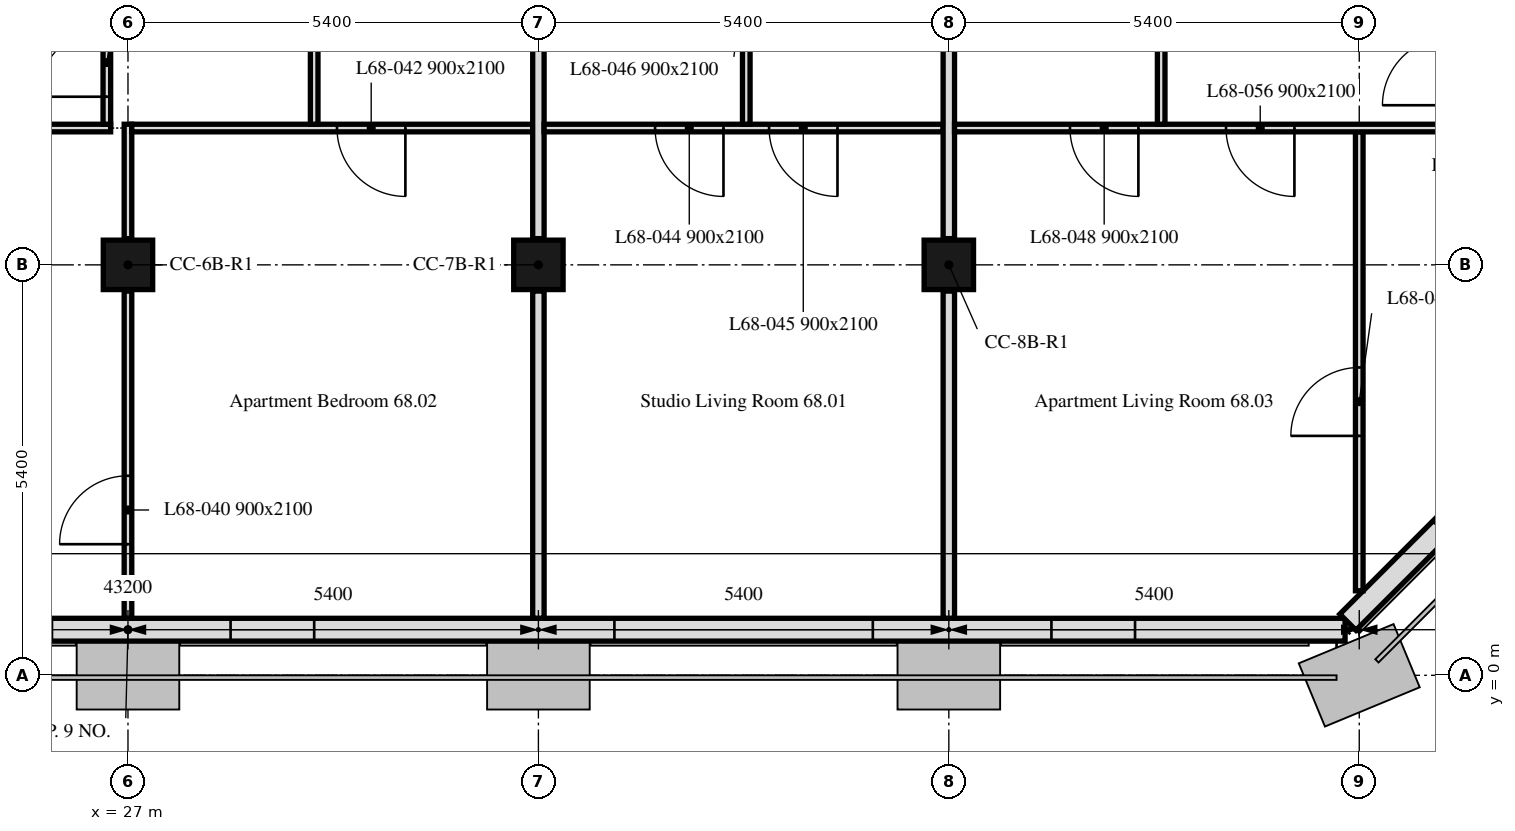
"""IFC4 building model, lengths in metres.
Left out: names, types, materials, properties, quantities, classifications, styles, units other than length and angle.
Written with IfcOpenShell. Run it as: python <this file> out.ifc"""

import sys

from ifc_helpers import new_model, si_unit, direction, frame, frame_2d, origin, origin_2d, place, context, subcontext, project, spatial, rectangle, extrude, element, fill, save


model = new_model("IFC4")
c1 = context("Model", 3, precision=1e-05, world=origin(), true_north=direction((0.0, 1.0)))
c2 = subcontext(c1, "Body", "Model", "MODEL_VIEW")
j1 = project(units=[si_unit("LENGTHUNIT", "METRE"), si_unit("PLANEANGLEUNIT", "RADIAN")], contexts=[c1])
p1 = place(None, origin())
s1 = spatial("IfcSite", under=j1, at=p1, CompositionType="ELEMENT")
p2 = place(p1, origin())
s2 = spatial("IfcBuilding", under=s1, at=p2, CompositionType="ELEMENT")
p3 = place(p2, frame((0.0, 0.0, 278.5)))
s3 = spatial("IfcBuildingStorey", under=s2, at=p3, CompositionType="ELEMENT", Elevation=278.5)
for number, where, z_axis, x_axis in (
    (1, (27.0, 5.4, 0.0), (0.0, 0.0, 1.0), (1.0, 0.0, 0.0)),
    (2, (32.4, 5.4, 0.0), (0.0, 0.0, 1.0), (1.0, 0.0, 0.0)),
    (3, (37.8, 5.4, 0.0), (0.0, 0.0, 1.0), (1.0, 0.0, 0.0)),
):
    element("IfcColumn", number, at=place(p3, frame(where, z_axis=z_axis, x_axis=x_axis)), inside=s3, PredefinedType="COLUMN", context=c2, shape_type="SweptSolid", body=[
        extrude(rectangle(XDim=0.65, YDim=0.65, at=origin_2d()), origin(), (0.0, 0.0, 1.0), 3.0),
    ])
p4 = place(p3, frame((10.986, 0.6, 0.0), z_axis=(0.0, 0.0, 1.0), x_axis=(1.0, 0.0, 0.0)))
e4 = element("IfcWall", 4, at=p4, inside=s3, PredefinedType="SOLIDWALL", context=c2, shape_type="SweptSolid", body=[
    extrude(rectangle(XDim=32.027, YDim=0.3, at=frame_2d((16.014, 0.0))), origin(), (0.0, 0.0, 1.0), 3.0),
])
p5 = place(p4, frame((0.814, 0.0, 0.9)))
e5 = element("IfcOpeningElement", 5, at=p5, cuts=e4, PredefinedType="OPENING", context=c2, shape_type="SweptSolid", body=[
    extrude(rectangle(XDim=3.4, YDim=1.7, at=frame_2d((1.7, 0.85))), frame((0.0, 0.16, 0.0), z_axis=(0.0, -1.0, 0.0), x_axis=(1.0, 0.0, 0.0)), (0.0, 0.0, 1.0), 0.32),
])
p6 = place(p4, frame((6.564, 0.0, 0.9)))
e6 = element("IfcOpeningElement", 6, at=p6, cuts=e4, PredefinedType="OPENING", context=c2, shape_type="SweptSolid", body=[
    extrude(rectangle(XDim=1.1, YDim=1.7, at=frame_2d((0.55, 0.85))), frame((0.0, 0.16, 0.0), z_axis=(0.0, -1.0, 0.0), x_axis=(1.0, 0.0, 0.0)), (0.0, 0.0, 1.0), 0.32),
])
p7 = place(p4, frame((11.614, 0.0, 0.9)))
e7 = element("IfcOpeningElement", 7, at=p7, cuts=e4, PredefinedType="OPENING", context=c2, shape_type="SweptSolid", body=[
    extrude(rectangle(XDim=3.4, YDim=1.7, at=frame_2d((1.7, 0.85))), frame((0.0, 0.16, 0.0), z_axis=(0.0, -1.0, 0.0), x_axis=(1.0, 0.0, 0.0)), (0.0, 0.0, 1.0), 0.32),
])
p8 = place(p4, frame((17.364, 0.0, 0.9)))
e8 = element("IfcOpeningElement", 8, at=p8, cuts=e4, PredefinedType="OPENING", context=c2, shape_type="SweptSolid", body=[
    extrude(rectangle(XDim=1.1, YDim=1.7, at=frame_2d((0.55, 0.85))), frame((0.0, 0.16, 0.0), z_axis=(0.0, -1.0, 0.0), x_axis=(1.0, 0.0, 0.0)), (0.0, 0.0, 1.0), 0.32),
])
p9 = place(p4, frame((22.414, 0.0, 0.9)))
e9 = element("IfcOpeningElement", 9, at=p9, cuts=e4, PredefinedType="OPENING", context=c2, shape_type="SweptSolid", body=[
    extrude(rectangle(XDim=3.4, YDim=1.7, at=frame_2d((1.7, 0.85))), frame((0.0, 0.16, 0.0), z_axis=(0.0, -1.0, 0.0), x_axis=(1.0, 0.0, 0.0)), (0.0, 0.0, 1.0), 0.32),
])
p10 = place(p4, frame((28.164, 0.0, 0.9)))
e10 = element("IfcOpeningElement", 10, at=p10, cuts=e4, PredefinedType="OPENING", context=c2, shape_type="SweptSolid", body=[
    extrude(rectangle(XDim=1.1, YDim=1.7, at=frame_2d((0.55, 0.85))), frame((0.0, 0.16, 0.0), z_axis=(0.0, -1.0, 0.0), x_axis=(1.0, 0.0, 0.0)), (0.0, 0.0, 1.0), 0.32),
])
p11 = place(p3, frame((43.051, 0.699, 0.0), z_axis=(0.0, 0.0, 1.0), x_axis=(0.707106781187, 0.707106781187, 0.0)))
e11 = element("IfcWall", 11, at=p11, inside=s3, PredefinedType="SOLIDWALL", context=c2, shape_type="SweptSolid", body=[
    extrude(rectangle(XDim=6.86, YDim=0.3, at=frame_2d((3.43, 0.0))), origin(), (0.0, 0.0, 1.0), 3.0),
])
p12 = place(p11, frame((1.73, 0.0, 0.9)))
e12 = element("IfcOpeningElement", 12, at=p12, cuts=e11, PredefinedType="OPENING", context=c2, shape_type="SweptSolid", body=[
    extrude(rectangle(XDim=3.4, YDim=1.7, at=frame_2d((1.7, 0.85))), frame((0.0, 0.16, 0.0), z_axis=(0.0, -1.0, 0.0), x_axis=(1.0, 0.0, 0.0)), (0.0, 0.0, 1.0), 0.32),
])
p13 = place(p3, frame((27.0, 0.751, 0.0), z_axis=(0.0, 0.0, 1.0), x_axis=(0.0, 1.0, 0.0)))
e13 = element("IfcWall", 13, at=p13, inside=s3, PredefinedType="PARTITIONING", context=c2, shape_type="SweptSolid", body=[
    extrude(rectangle(XDim=4.304, YDim=0.1, at=frame_2d((2.152, 0.0))), origin(), (0.0, 0.0, 1.0), 2.4),
])
p14 = place(p13, frame((0.974, 0.0, 0.0)))
e14 = element("IfcOpeningElement", 14, at=p14, cuts=e13, PredefinedType="OPENING", context=c2, shape_type="SweptSolid", body=[
    extrude(rectangle(XDim=0.9, YDim=2.1, at=frame_2d((0.45, 1.05))), frame((0.0, 0.05, 0.0), z_axis=(0.0, -1.0, 0.0), x_axis=(1.0, 0.0, 0.0)), (0.0, 0.0, 1.0), 0.1),
])
p15 = place(p3, frame((27.0, 5.745, 0.0), z_axis=(0.0, 0.0, 1.0), x_axis=(0.0, 1.0, 0.0)))
e15 = element("IfcWall", 15, at=p15, inside=s3, PredefinedType="PARTITIONING", context=c2, shape_type="SweptSolid", body=[
    extrude(rectangle(XDim=1.505, YDim=0.1, at=frame_2d((0.752, 0.0))), origin(), (0.0, 0.0, 1.0), 2.4),
])
p16 = place(p3, frame((26.772, 7.2, 0.0), z_axis=(0.0, 0.0, 1.0), x_axis=(-1.0, 0.0, 0.0)))
e16 = element("IfcWall", 16, at=p16, inside=s3, PredefinedType="PARTITIONING", context=c2, shape_type="SweptSolid", body=[
    extrude(rectangle(XDim=5.097, YDim=0.1, at=frame_2d((2.548, 0.0))), origin(), (0.0, 0.0, 1.0), 3.0),
])
p17 = place(p16, frame((3.801, 0.0, 0.0)))
e17 = element("IfcOpeningElement", 17, at=p17, cuts=e16, PredefinedType="OPENING", context=c2, shape_type="SweptSolid", body=[
    extrude(rectangle(XDim=0.9, YDim=2.1, at=frame_2d((0.45, 1.05))), frame((0.0, 0.05, 0.0), z_axis=(0.0, -1.0, 0.0), x_axis=(1.0, 0.0, 0.0)), (0.0, 0.0, 1.0), 0.1),
])
p18 = place(p16, frame((1.732, 0.0, 0.0)))
e18 = element("IfcOpeningElement", 18, at=p18, cuts=e16, PredefinedType="OPENING", context=c2, shape_type="SweptSolid", body=[
    extrude(rectangle(XDim=0.9, YDim=2.1, at=frame_2d((0.45, 1.05))), frame((0.0, 0.05, 0.0), z_axis=(0.0, -1.0, 0.0), x_axis=(1.0, 0.0, 0.0)), (0.0, 0.0, 1.0), 0.1),
])
p19 = place(p3, frame((32.4, 0.751, 0.0), z_axis=(0.0, 0.0, 1.0), x_axis=(0.0, 1.0, 0.0)))
e19 = element("IfcWall", 19, at=p19, inside=s3, PredefinedType="PARTITIONING", context=c2, shape_type="SweptSolid", body=[
    extrude(rectangle(XDim=4.304, YDim=0.15, at=frame_2d((2.152, 0.0))), origin(), (0.0, 0.0, 1.0), 2.4),
])
p20 = place(p3, frame((32.325, 7.2, 0.0), z_axis=(0.0, 0.0, 1.0), x_axis=(-1.0, 0.0, 0.0)))
e20 = element("IfcWall", 20, at=p20, inside=s3, PredefinedType="PARTITIONING", context=c2, shape_type="SweptSolid", body=[
    extrude(rectangle(XDim=5.275, YDim=0.1, at=frame_2d((2.637, 0.0))), origin(), (0.0, 0.0, 1.0), 3.0),
])
p21 = place(p20, frame((1.675, 0.0, 0.0)))
e21 = element("IfcOpeningElement", 21, at=p21, cuts=e20, PredefinedType="OPENING", context=c2, shape_type="SweptSolid", body=[
    extrude(rectangle(XDim=0.9, YDim=2.1, at=frame_2d((0.45, 1.05))), frame((0.0, 0.05, 0.0), z_axis=(0.0, -1.0, 0.0), x_axis=(1.0, 0.0, 0.0)), (0.0, 0.0, 1.0), 0.1),
])
p22 = place(p3, frame((26.722, 7.25, 0.0), z_axis=(0.0, 0.0, 1.0), x_axis=(0.0, 1.0, 0.0)))
e22 = element("IfcWall", 22, at=p22, inside=s3, PredefinedType="PARTITIONING", context=c2, shape_type="SweptSolid", body=[
    extrude(rectangle(XDim=3.205, YDim=0.1, at=frame_2d((1.603, 0.0))), origin(), (0.0, 0.0, 1.0), 3.0),
])
p23 = place(p22, frame((0.362, 0.0, 0.0)))
e23 = element("IfcOpeningElement", 23, at=p23, cuts=e22, PredefinedType="OPENING", context=c2, shape_type="SweptSolid", body=[
    extrude(rectangle(XDim=0.9, YDim=2.1, at=frame_2d((0.45, 1.05))), frame((0.0, 0.05, 0.0), z_axis=(0.0, -1.0, 0.0), x_axis=(1.0, 0.0, 0.0)), (0.0, 0.0, 1.0), 0.1),
])
p24 = place(p3, frame((29.45, 7.25, 0.0), z_axis=(0.0, 0.0, 1.0), x_axis=(0.0, 1.0, 0.0)))
e24 = element("IfcWall", 24, at=p24, inside=s3, PredefinedType="PARTITIONING", context=c2, shape_type="SweptSolid", body=[
    extrude(rectangle(XDim=7.075, YDim=0.1, at=frame_2d((3.538, 0.0))), origin(), (0.0, 0.0, 1.0), 3.0),
])
p25 = place(p3, frame((32.4, 5.745, 0.0), z_axis=(0.0, 0.0, 1.0), x_axis=(0.0, 1.0, 0.0)))
e25 = element("IfcWall", 25, at=p25, inside=s3, PredefinedType="PARTITIONING", context=c2, shape_type="SweptSolid", body=[
    extrude(rectangle(XDim=4.71, YDim=0.15, at=frame_2d((2.355, 0.0))), origin(), (0.0, 0.0, 1.0), 2.4),
])
p26 = place(p3, frame((37.8, 0.751, 0.0), z_axis=(0.0, 0.0, 1.0), x_axis=(0.0, 1.0, 0.0)))
e26 = element("IfcWall", 26, at=p26, inside=s3, PredefinedType="PARTITIONING", context=c2, shape_type="SweptSolid", body=[
    extrude(rectangle(XDim=4.304, YDim=0.15, at=frame_2d((2.152, 0.0))), origin(), (0.0, 0.0, 1.0), 2.4),
])
p27 = place(p3, frame((37.725, 7.2, 0.0), z_axis=(0.0, 0.0, 1.0), x_axis=(-1.0, 0.0, 0.0)))
e27 = element("IfcWall", 27, at=p27, inside=s3, PredefinedType="PARTITIONING", context=c2, shape_type="SweptSolid", body=[
    extrude(rectangle(XDim=5.25, YDim=0.1, at=frame_2d((2.625, 0.0))), origin(), (0.0, 0.0, 1.0), 3.0),
])
p28 = place(p27, frame((2.89, 0.0, 0.0)))
e28 = element("IfcOpeningElement", 28, at=p28, cuts=e27, PredefinedType="OPENING", context=c2, shape_type="SweptSolid", body=[
    extrude(rectangle(XDim=0.9, YDim=2.1, at=frame_2d((0.45, 1.05))), frame((0.0, 0.05, 0.0), z_axis=(0.0, -1.0, 0.0), x_axis=(1.0, 0.0, 0.0)), (0.0, 0.0, 1.0), 0.1),
])
p29 = place(p27, frame((1.39, 0.0, 0.0)))
e29 = element("IfcOpeningElement", 29, at=p29, cuts=e27, PredefinedType="OPENING", context=c2, shape_type="SweptSolid", body=[
    extrude(rectangle(XDim=0.9, YDim=2.1, at=frame_2d((0.45, 1.05))), frame((0.0, 0.05, 0.0), z_axis=(0.0, -1.0, 0.0), x_axis=(1.0, 0.0, 0.0)), (0.0, 0.0, 1.0), 0.1),
])
p30 = place(p3, frame((35.135, 7.25, 0.0), z_axis=(0.0, 0.0, 1.0), x_axis=(0.0, 1.0, 0.0)))
e30 = element("IfcWall", 30, at=p30, inside=s3, PredefinedType="PARTITIONING", context=c2, shape_type="SweptSolid", body=[
    extrude(rectangle(XDim=7.075, YDim=0.1, at=frame_2d((3.538, 0.0))), origin(), (0.0, 0.0, 1.0), 2.4),
])
p31 = place(p30, frame((5.45, 0.0, 0.0)))
e31 = element("IfcOpeningElement", 31, at=p31, cuts=e30, PredefinedType="OPENING", context=c2, shape_type="SweptSolid", body=[
    extrude(rectangle(XDim=0.9, YDim=2.1, at=frame_2d((0.45, 1.05))), frame((0.0, 0.05, 0.0), z_axis=(0.0, -1.0, 0.0), x_axis=(1.0, 0.0, 0.0)), (0.0, 0.0, 1.0), 0.1),
])
p32 = place(p30, frame((1.6, 0.0, 0.0)))
e32 = element("IfcOpeningElement", 32, at=p32, cuts=e30, PredefinedType="OPENING", context=c2, shape_type="SweptSolid", body=[
    extrude(rectangle(XDim=0.9, YDim=2.1, at=frame_2d((0.45, 1.05))), frame((0.0, 0.05, 0.0), z_axis=(0.0, -1.0, 0.0), x_axis=(1.0, 0.0, 0.0)), (0.0, 0.0, 1.0), 0.1),
])
p33 = place(p3, frame((37.8, 5.745, 0.0), z_axis=(0.0, 0.0, 1.0), x_axis=(0.0, 1.0, 0.0)))
e33 = element("IfcWall", 33, at=p33, inside=s3, PredefinedType="PARTITIONING", context=c2, shape_type="SweptSolid", body=[
    extrude(rectangle(XDim=4.71, YDim=0.15, at=frame_2d((2.355, 0.0))), origin(), (0.0, 0.0, 1.0), 2.4),
])
p34 = place(p3, frame((43.2, 1.112, 0.0), z_axis=(0.0, 0.0, 1.0), x_axis=(0.0, 1.0, 0.0)))
e34 = element("IfcWall", 34, at=p34, inside=s3, PredefinedType="PARTITIONING", context=c2, shape_type="SweptSolid", body=[
    extrude(rectangle(XDim=6.038, YDim=0.1, at=frame_2d((3.019, 0.0))), origin(), (0.0, 0.0, 1.0), 3.0),
])
p35 = place(p34, frame((2.038, 0.0, 0.0)))
e35 = element("IfcOpeningElement", 35, at=p35, cuts=e34, PredefinedType="OPENING", context=c2, shape_type="SweptSolid", body=[
    extrude(rectangle(XDim=0.9, YDim=2.1, at=frame_2d((0.45, 1.05))), frame((0.0, 0.05, 0.0), z_axis=(0.0, -1.0, 0.0), x_axis=(1.0, 0.0, 0.0)), (0.0, 0.0, 1.0), 0.1),
])
p36 = place(p3, frame((47.849, 7.2, 0.0), z_axis=(0.0, 0.0, 1.0), x_axis=(-1.0, 0.0, 0.0)))
e36 = element("IfcWall", 36, at=p36, inside=s3, PredefinedType="PARTITIONING", context=c2, shape_type="SweptSolid", body=[
    extrude(rectangle(XDim=9.974, YDim=0.1, at=frame_2d((4.987, 0.0))), origin(), (0.0, 0.0, 1.0), 3.0),
])
p37 = place(p36, frame((7.555, 0.0, 0.0)))
e37 = element("IfcOpeningElement", 37, at=p37, cuts=e36, PredefinedType="OPENING", context=c2, shape_type="SweptSolid", body=[
    extrude(rectangle(XDim=0.9, YDim=2.1, at=frame_2d((0.45, 1.05))), frame((0.0, 0.05, 0.0), z_axis=(0.0, -1.0, 0.0), x_axis=(1.0, 0.0, 0.0)), (0.0, 0.0, 1.0), 0.1),
])
p38 = place(p36, frame((5.502, 0.0, 0.0)))
e38 = element("IfcOpeningElement", 38, at=p38, cuts=e36, PredefinedType="OPENING", context=c2, shape_type="SweptSolid", body=[
    extrude(rectangle(XDim=0.9, YDim=2.1, at=frame_2d((0.45, 1.05))), frame((0.0, 0.05, 0.0), z_axis=(0.0, -1.0, 0.0), x_axis=(1.0, 0.0, 0.0)), (0.0, 0.0, 1.0), 0.1),
])
p39 = place(p36, frame((0.25, 0.0, 0.0)))
e39 = element("IfcOpeningElement", 39, at=p39, cuts=e36, PredefinedType="OPENING", context=c2, shape_type="SweptSolid", body=[
    extrude(rectangle(XDim=0.8, YDim=2.1, at=frame_2d((0.4, 1.05))), frame((0.0, 0.05, 0.0), z_axis=(0.0, -1.0, 0.0), x_axis=(1.0, 0.0, 0.0)), (0.0, 0.0, 1.0), 0.1),
])
p40 = place(p3, frame((40.594, 7.25, 0.0), z_axis=(0.0, 0.0, 1.0), x_axis=(0.0, 1.0, 0.0)))
e40 = element("IfcWall", 40, at=p40, inside=s3, PredefinedType="PARTITIONING", context=c2, shape_type="SweptSolid", body=[
    extrude(rectangle(XDim=7.075, YDim=0.1, at=frame_2d((3.538, 0.0))), origin(), (0.0, 0.0, 1.0), 2.4),
])
p41 = place(p40, frame((5.2, 0.0, 0.0)))
e41 = element("IfcOpeningElement", 41, at=p41, cuts=e40, PredefinedType="OPENING", context=c2, shape_type="SweptSolid", body=[
    extrude(rectangle(XDim=0.9, YDim=2.1, at=frame_2d((0.45, 1.05))), frame((0.0, 0.05, 0.0), z_axis=(0.0, -1.0, 0.0), x_axis=(1.0, 0.0, 0.0)), (0.0, 0.0, 1.0), 0.1),
])
p42 = place(p40, frame((1.6, 0.0, 0.0)))
e42 = element("IfcOpeningElement", 42, at=p42, cuts=e40, PredefinedType="OPENING", context=c2, shape_type="SweptSolid", body=[
    extrude(rectangle(XDim=0.9, YDim=2.1, at=frame_2d((0.45, 1.05))), frame((0.0, 0.05, 0.0), z_axis=(0.0, -1.0, 0.0), x_axis=(1.0, 0.0, 0.0)), (0.0, 0.0, 1.0), 0.1),
])
p43 = place(p8, origin())
e43 = element("IfcWindow", 43, at=p43, inside=s3, PartitioningType="SINGLE_PANEL", PredefinedType="WINDOW", context=c2, shape_type="SweptSolid", body=[
    extrude(rectangle(XDim=1.1, YDim=1.7, at=frame_2d((0.55, 0.85))), frame((0.0, 0.03, 0.0), z_axis=(0.0, -1.0, 0.0), x_axis=(1.0, 0.0, 0.0)), (0.0, 0.0, 1.0), 0.06),
])
fill(e8, e43)
p44 = place(p9, origin())
e44 = element("IfcWindow", 44, at=p44, inside=s3, PartitioningType="SINGLE_PANEL", PredefinedType="WINDOW", context=c2, shape_type="SweptSolid", body=[
    extrude(rectangle(XDim=3.4, YDim=1.7, at=frame_2d((1.7, 0.85))), frame((0.0, 0.03, 0.0), z_axis=(0.0, -1.0, 0.0), x_axis=(1.0, 0.0, 0.0)), (0.0, 0.0, 1.0), 0.06),
])
fill(e9, e44)
p45 = place(p10, origin())
e45 = element("IfcWindow", 45, at=p45, inside=s3, PartitioningType="SINGLE_PANEL", PredefinedType="WINDOW", context=c2, shape_type="SweptSolid", body=[
    extrude(rectangle(XDim=1.1, YDim=1.7, at=frame_2d((0.55, 0.85))), frame((0.0, 0.03, 0.0), z_axis=(0.0, -1.0, 0.0), x_axis=(1.0, 0.0, 0.0)), (0.0, 0.0, 1.0), 0.06),
])
fill(e10, e45)
p46 = place(p23, origin())
e46 = element("IfcDoor", 46, at=p46, inside=s3, OperationType="SINGLE_SWING_RIGHT", PredefinedType="DOOR", context=c2, shape_type="SweptSolid", body=[
    extrude(rectangle(XDim=0.9, YDim=2.1, at=frame_2d((0.45, 1.05))), frame((0.0, 0.025, 0.0), z_axis=(0.0, -1.0, 0.0), x_axis=(1.0, 0.0, 0.0)), (0.0, 0.0, 1.0), 0.05),
])
fill(e23, e46)
p47 = place(p14, origin())
e47 = element("IfcDoor", 47, at=p47, inside=s3, OperationType="SINGLE_SWING_RIGHT", PredefinedType="DOOR", context=c2, shape_type="SweptSolid", body=[
    extrude(rectangle(XDim=0.9, YDim=2.1, at=frame_2d((0.45, 1.05))), frame((0.0, 0.025, 0.0), z_axis=(0.0, -1.0, 0.0), x_axis=(1.0, 0.0, 0.0)), (0.0, 0.0, 1.0), 0.05),
])
fill(e14, e47)
p48 = place(p21, origin())
e48 = element("IfcDoor", 48, at=p48, inside=s3, OperationType="SINGLE_SWING_LEFT", PredefinedType="DOOR", context=c2, shape_type="SweptSolid", body=[
    extrude(rectangle(XDim=0.9, YDim=2.1, at=frame_2d((0.45, 1.05))), frame((0.0, 0.025, 0.0), z_axis=(0.0, -1.0, 0.0), x_axis=(1.0, 0.0, 0.0)), (0.0, 0.0, 1.0), 0.05),
])
fill(e21, e48)
p49 = place(p28, origin())
e49 = element("IfcDoor", 49, at=p49, inside=s3, OperationType="SINGLE_SWING_RIGHT", PredefinedType="DOOR", context=c2, shape_type="SweptSolid", body=[
    extrude(rectangle(XDim=0.9, YDim=2.1, at=frame_2d((0.45, 1.05))), frame((0.0, 0.025, 0.0), z_axis=(0.0, -1.0, 0.0), x_axis=(1.0, 0.0, 0.0)), (0.0, 0.0, 1.0), 0.05),
])
fill(e28, e49)
p50 = place(p29, origin())
e50 = element("IfcDoor", 50, at=p50, inside=s3, OperationType="SINGLE_SWING_LEFT", PredefinedType="DOOR", context=c2, shape_type="SweptSolid", body=[
    extrude(rectangle(XDim=0.9, YDim=2.1, at=frame_2d((0.45, 1.05))), frame((0.0, 0.025, 0.0), z_axis=(0.0, -1.0, 0.0), x_axis=(1.0, 0.0, 0.0)), (0.0, 0.0, 1.0), 0.05),
])
fill(e29, e50)
p51 = place(p35, origin())
e51 = element("IfcDoor", 51, at=p51, inside=s3, OperationType="SINGLE_SWING_LEFT", PredefinedType="DOOR", context=c2, shape_type="SweptSolid", body=[
    extrude(rectangle(XDim=0.9, YDim=2.1, at=frame_2d((0.45, 1.05))), frame((0.0, 0.025, 0.0), z_axis=(0.0, -1.0, 0.0), x_axis=(1.0, 0.0, 0.0)), (0.0, 0.0, 1.0), 0.05),
])
fill(e35, e51)
p52 = place(p37, origin())
e52 = element("IfcDoor", 52, at=p52, inside=s3, OperationType="SINGLE_SWING_LEFT", PredefinedType="DOOR", context=c2, shape_type="SweptSolid", body=[
    extrude(rectangle(XDim=0.9, YDim=2.1, at=frame_2d((0.45, 1.05))), frame((0.0, 0.025, 0.0), z_axis=(0.0, -1.0, 0.0), x_axis=(1.0, 0.0, 0.0)), (0.0, 0.0, 1.0), 0.05),
])
fill(e37, e52)
p53 = place(p38, origin())
e53 = element("IfcDoor", 53, at=p53, inside=s3, OperationType="SINGLE_SWING_RIGHT", PredefinedType="DOOR", context=c2, shape_type="SweptSolid", body=[
    extrude(rectangle(XDim=0.9, YDim=2.1, at=frame_2d((0.45, 1.05))), frame((0.0, 0.025, 0.0), z_axis=(0.0, -1.0, 0.0), x_axis=(1.0, 0.0, 0.0)), (0.0, 0.0, 1.0), 0.05),
])
fill(e38, e53)
save(model, sys.argv[1])
